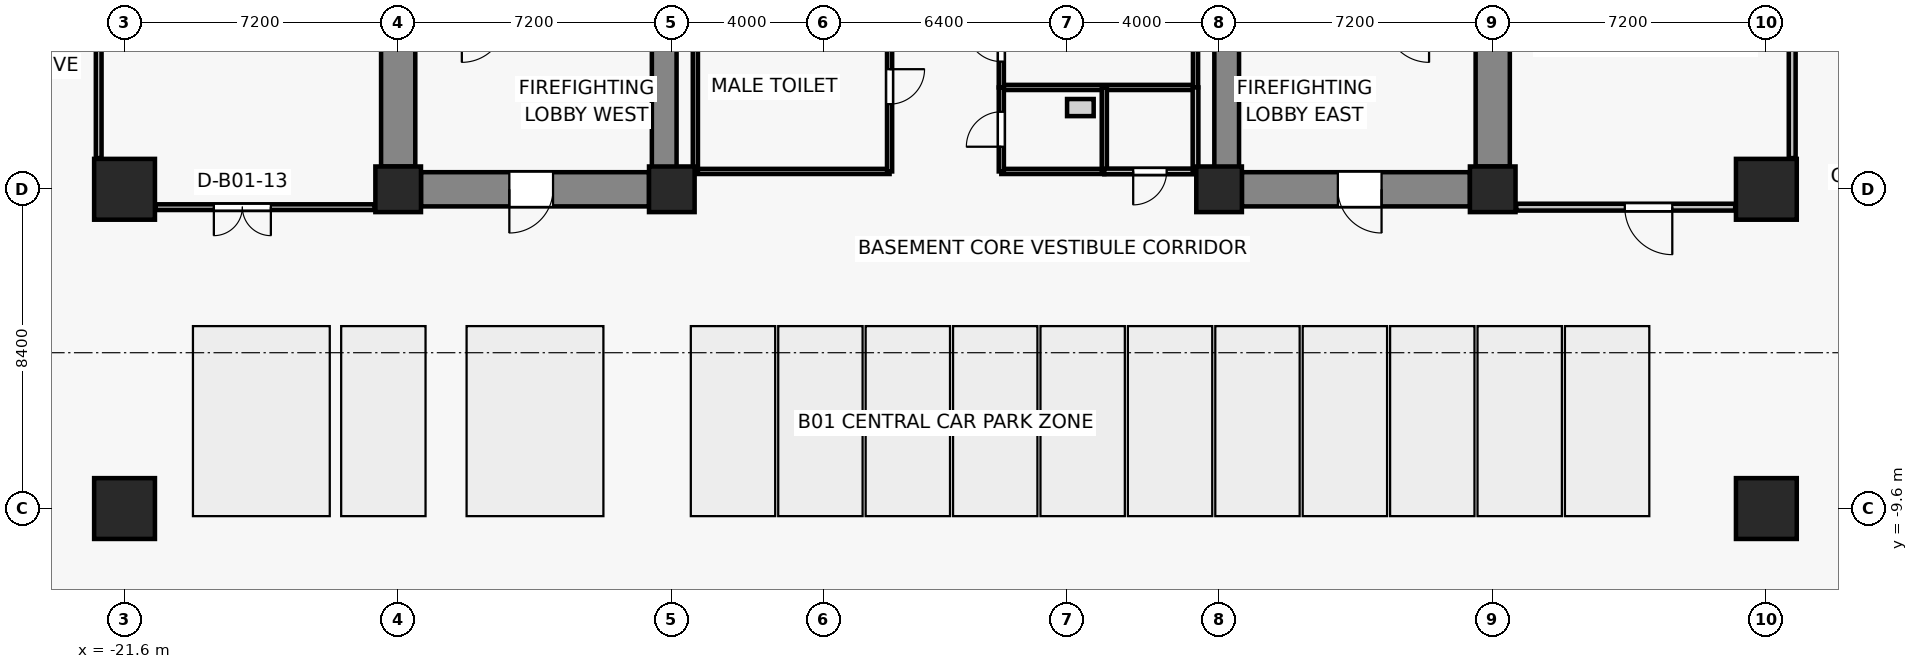
"""IFC4 building model, lengths in metres.
Left out: names, types, materials, properties, quantities, classifications, styles, units other than length and angle.
Written with IfcOpenShell. Run it as: python <this file> out.ifc"""

import sys

from ifc_helpers import new_model, si_unit, direction, frame, frame_2d, origin, origin_2d, place, context, subcontext, project, spatial, rectangle, extrude, source, transform, mapped, element, fill, save


model = new_model("IFC4")
c1 = context("Model", 3, precision=1e-05, world=origin(), true_north=direction((0.0, 1.0)))
c2 = subcontext(c1, "Body", "Model", "MODEL_VIEW")
j1 = project(units=[si_unit("LENGTHUNIT", "METRE"), si_unit("PLANEANGLEUNIT", "RADIAN")], contexts=[c1])
p1 = place(None, origin())
s1 = spatial("IfcSite", under=j1, at=p1, CompositionType="ELEMENT")
p2 = place(p1, origin())
s2 = spatial("IfcBuilding", under=s1, at=p2, CompositionType="ELEMENT")
p3 = place(p2, frame((0.0, 0.0, -4.4)))
s3 = spatial("IfcBuildingStorey", under=s2, at=p3, CompositionType="ELEMENT", Elevation=-4.4)
for number, where, z_axis, x_axis in (
    (1, (-14.4, -1.2, 0.0), (0.0, 0.0, 1.0), (1.0, 0.0, 0.0)),
    (2, (-7.2, -1.2, 0.0), (0.0, 0.0, 1.0), (1.0, 0.0, 0.0)),
    (3, (7.2, -1.2, 0.0), (0.0, 0.0, 1.0), (1.0, 0.0, 0.0)),
    (4, (14.4, -1.2, 0.0), (0.0, 0.0, 1.0), (1.0, 0.0, 0.0)),
):
    element("IfcColumn", number, at=place(p3, frame(where, z_axis=z_axis, x_axis=x_axis)), inside=s3, PredefinedType="COLUMN", context=c2, shape_type="SweptSolid", body=[
        extrude(rectangle(XDim=1.2, YDim=1.2, at=origin_2d()), origin(), (0.0, 0.0, 1.0), 4.4),
    ])
for number, where, z_axis, x_axis in (
    (5, (-21.6, -9.6, 0.0), (0.0, 0.0, 1.0), (1.0, 0.0, 0.0)),
    (6, (21.6, -9.6, 0.0), (0.0, 0.0, 1.0), (1.0, 0.0, 0.0)),
    (7, (-21.6, -1.2, 0.0), (0.0, 0.0, 1.0), (1.0, 0.0, 0.0)),
    (8, (21.6, -1.2, 0.0), (0.0, 0.0, 1.0), (1.0, 0.0, 0.0)),
):
    element("IfcColumn", number, at=place(p3, frame(where, z_axis=z_axis, x_axis=x_axis)), inside=s3, PredefinedType="COLUMN", context=c2, shape_type="SweptSolid", body=[
        extrude(rectangle(XDim=1.6, YDim=1.6, at=origin_2d()), origin(), (0.0, 0.0, 1.0), 4.4),
    ])
for number, where, z_axis, x_axis in (
    (9, (-14.4, -0.6, 0.0), (0.0, 0.0, 1.0), (0.0, 1.0, 0.0)),
    (10, (14.4, -0.6, 0.0), (0.0, 0.0, 1.0), (0.0, 1.0, 0.0)),
):
    element("IfcWall", number, at=place(p3, frame(where, z_axis=z_axis, x_axis=x_axis)), inside=s3, PredefinedType="SHEAR", context=c2, shape_type="SweptSolid", body=[
        extrude(rectangle(XDim=6.6, YDim=0.9, at=frame_2d((3.3, 0.0))), origin(), (0.0, 0.0, 1.0), 4.1),
    ])
p4 = place(p3, frame((-7.8, -1.2, 0.0), z_axis=(0.0, 0.0, 1.0), x_axis=(-1.0, 0.0, 0.0)))
e11 = element("IfcWall", 11, at=p4, inside=s3, PredefinedType="SHEAR", context=c2, shape_type="SweptSolid", body=[
    extrude(rectangle(XDim=6.0, YDim=0.9, at=frame_2d((3.0, 0.0))), origin(), (0.0, 0.0, 1.0), 4.1),
])
p5 = place(p4, frame((2.525, 0.0, 0.0)))
e12 = element("IfcOpeningElement", 12, at=p5, cuts=e11, PredefinedType="OPENING", context=c2, shape_type="SweptSolid", body=[
    extrude(rectangle(XDim=1.15, YDim=2.15, at=frame_2d((0.575, 1.075))), frame((0.0, 0.46, 0.0), z_axis=(0.0, -1.0, 0.0), x_axis=(1.0, 0.0, 0.0)), (0.0, 0.0, 1.0), 0.92),
])
p6 = place(p3, frame((13.8, -1.2, 0.0), z_axis=(0.0, 0.0, 1.0), x_axis=(-1.0, 0.0, 0.0)))
e13 = element("IfcWall", 13, at=p6, inside=s3, PredefinedType="SHEAR", context=c2, shape_type="SweptSolid", body=[
    extrude(rectangle(XDim=6.0, YDim=0.9, at=frame_2d((3.0, 0.0))), origin(), (0.0, 0.0, 1.0), 4.1),
])
p7 = place(p6, frame((2.325, 0.0, 0.0)))
e14 = element("IfcOpeningElement", 14, at=p7, cuts=e13, PredefinedType="OPENING", context=c2, shape_type="SweptSolid", body=[
    extrude(rectangle(XDim=1.15, YDim=2.15, at=frame_2d((0.575, 1.075))), frame((0.0, 0.46, 0.0), z_axis=(0.0, -1.0, 0.0), x_axis=(1.0, 0.0, 0.0)), (0.0, 0.0, 1.0), 0.92),
])
for number, where, z_axis, x_axis in (
    (15, (-7.4, -0.75, 0.0), (0.0, 0.0, 1.0), (0.0, 1.0, 0.0)),
    (16, (7.4, -0.75, 0.0), (0.0, 0.0, 1.0), (0.0, 1.0, 0.0)),
):
    element("IfcWall", number, at=place(p3, frame(where, z_axis=z_axis, x_axis=x_axis)), inside=s3, PredefinedType="SHEAR", context=c2, shape_type="SweptSolid", body=[
        extrude(rectangle(XDim=4.0, YDim=0.65, at=frame_2d((2.0, 0.0))), origin(), (0.0, 0.0, 1.0), 4.1),
    ])
p8 = place(p3, frame((-1.47, -0.73, 0.0), z_axis=(0.0, 0.0, 1.0), x_axis=(-1.0, 0.0, 0.0)))
e17 = element("IfcWall", 17, at=p8, inside=s3, PredefinedType="PARTITIONING", context=c2, shape_type="SweptSolid", body=[
    extrude(rectangle(XDim=5.11, YDim=0.135, at=frame_2d((2.555, 0.0))), origin(), (0.0, 0.0, 1.0), 4.1),
])
p9 = place(p3, frame((-6.58, -0.73, 0.0), z_axis=(0.0, 0.0, 1.0), x_axis=(0.0, 1.0, 0.0)))
e18 = element("IfcWall", 18, at=p9, inside=s3, PredefinedType="PARTITIONING", context=c2, shape_type="SweptSolid", body=[
    extrude(rectangle(XDim=4.49, YDim=0.135, at=frame_2d((2.245, 0.0))), origin(), (0.0, 0.0, 1.0), 3.473),
])
p10 = place(p3, frame((-1.47, 3.76, 0.0), z_axis=(0.0, 0.0, 1.0), x_axis=(0.0, -1.0, 0.0)))
e19 = element("IfcWall", 19, at=p10, inside=s3, PredefinedType="PARTITIONING", context=c2, shape_type="SweptSolid", body=[
    extrude(rectangle(XDim=4.49, YDim=0.135, at=frame_2d((2.245, 0.0))), origin(), (0.0, 0.0, 1.0), 3.473),
])
p11 = place(p10, frame((1.8, 0.0, 0.0)))
e20 = element("IfcOpeningElement", 20, at=p11, cuts=e19, PredefinedType="OPENING", context=c2, shape_type="SweptSolid", body=[
    extrude(rectangle(XDim=0.92, YDim=2.1, at=frame_2d((0.46, 1.05))), frame((0.0, 0.077, 0.0), z_axis=(0.0, -1.0, 0.0), x_axis=(1.0, 0.0, 0.0)), (0.0, 0.0, 1.0), 0.155),
])
p12 = place(p3, frame((6.58, 1.48, 0.0), z_axis=(0.0, 0.0, 1.0), x_axis=(-1.0, 0.0, 0.0)))
e21 = element("IfcWall", 21, at=p12, inside=s3, PredefinedType="PARTITIONING", context=c2, shape_type="SweptSolid", body=[
    extrude(rectangle(XDim=5.11, YDim=0.135, at=frame_2d((2.555, 0.0))), origin(), (0.0, 0.0, 1.0), 4.1),
])
p13 = place(p3, frame((1.47, 1.48, 0.0), z_axis=(0.0, 0.0, 1.0), x_axis=(0.0, 1.0, 0.0)))
e22 = element("IfcWall", 22, at=p13, inside=s3, PredefinedType="PARTITIONING", context=c2, shape_type="SweptSolid", body=[
    extrude(rectangle(XDim=2.28, YDim=0.135, at=frame_2d((1.14, 0.0))), origin(), (0.0, 0.0, 1.0), 3.473),
])
p14 = place(p13, frame((0.68, 0.0, 0.0)))
e23 = element("IfcOpeningElement", 23, at=p14, cuts=e22, PredefinedType="OPENING", context=c2, shape_type="SweptSolid", body=[
    extrude(rectangle(XDim=0.92, YDim=2.1, at=frame_2d((0.46, 1.05))), frame((0.0, 0.077, 0.0), z_axis=(0.0, -1.0, 0.0), x_axis=(1.0, 0.0, 0.0)), (0.0, 0.0, 1.0), 0.155),
])
p15 = place(p3, frame((6.58, 3.76, 0.0), z_axis=(0.0, 0.0, 1.0), x_axis=(0.0, -1.0, 0.0)))
e24 = element("IfcWall", 24, at=p15, inside=s3, PredefinedType="PARTITIONING", context=c2, shape_type="SweptSolid", body=[
    extrude(rectangle(XDim=2.28, YDim=0.135, at=frame_2d((1.14, 0.0))), origin(), (0.0, 0.0, 1.0), 3.473),
])
p16 = place(p3, frame((4.18, -0.73, 0.0), z_axis=(0.0, 0.0, 1.0), x_axis=(-1.0, 0.0, 0.0)))
e25 = element("IfcWall", 25, at=p16, inside=s3, PredefinedType="PARTITIONING", context=c2, shape_type="SweptSolid", body=[
    extrude(rectangle(XDim=2.71, YDim=0.135, at=frame_2d((1.355, 0.0))), origin(), (0.0, 0.0, 1.0), 4.1),
])
p17 = place(p3, frame((1.47, -0.73, 0.0), z_axis=(0.0, 0.0, 1.0), x_axis=(0.0, 1.0, 0.0)))
e26 = element("IfcWall", 26, at=p17, inside=s3, PredefinedType="PARTITIONING", context=c2, shape_type="SweptSolid", body=[
    extrude(rectangle(XDim=2.21, YDim=0.135, at=frame_2d((1.105, 0.0))), origin(), (0.0, 0.0, 1.0), 4.1),
])
p18 = place(p17, frame((0.65, 0.0, 0.0)))
e27 = element("IfcOpeningElement", 27, at=p18, cuts=e26, PredefinedType="OPENING", context=c2, shape_type="SweptSolid", body=[
    extrude(rectangle(XDim=0.92, YDim=2.1, at=frame_2d((0.46, 1.05))), frame((0.0, 0.077, 0.0), z_axis=(0.0, -1.0, 0.0), x_axis=(1.0, 0.0, 0.0)), (0.0, 0.0, 1.0), 0.155),
])
p19 = place(p3, frame((4.18, 1.48, 0.0), z_axis=(0.0, 0.0, 1.0), x_axis=(0.0, -1.0, 0.0)))
e28 = element("IfcWall", 28, at=p19, inside=s3, PredefinedType="PARTITIONING", context=c2, shape_type="SweptSolid", body=[
    extrude(rectangle(XDim=2.21, YDim=0.135, at=frame_2d((1.105, 0.0))), origin(), (0.0, 0.0, 1.0), 4.1),
])
p20 = place(p3, frame((6.58, -0.73, 0.0), z_axis=(0.0, 0.0, 1.0), x_axis=(-1.0, 0.0, 0.0)))
e29 = element("IfcWall", 29, at=p20, inside=s3, PredefinedType="PARTITIONING", context=c2, shape_type="SweptSolid", body=[
    extrude(rectangle(XDim=2.4, YDim=0.15, at=frame_2d((1.2, 0.0))), origin(), (0.0, 0.0, 1.0), 4.1),
])
p21 = place(p20, frame((0.76, 0.0, 0.0)))
e30 = element("IfcOpeningElement", 30, at=p21, cuts=e29, PredefinedType="OPENING", context=c2, shape_type="SweptSolid", body=[
    extrude(rectangle(XDim=0.88, YDim=2.1, at=frame_2d((0.44, 1.05))), frame((0.0, 0.085, 0.0), z_axis=(0.0, -1.0, 0.0), x_axis=(1.0, 0.0, 0.0)), (0.0, 0.0, 1.0), 0.17),
])
p22 = place(p3, frame((6.58, 1.48, 0.0), z_axis=(0.0, 0.0, 1.0), x_axis=(0.0, -1.0, 0.0)))
e31 = element("IfcWall", 31, at=p22, inside=s3, PredefinedType="PARTITIONING", context=c2, shape_type="SweptSolid", body=[
    extrude(rectangle(XDim=2.21, YDim=0.15, at=frame_2d((1.105, 0.0))), origin(), (0.0, 0.0, 1.0), 4.1),
])
p23 = place(p3, frame((-15.02, -1.67, 0.0), z_axis=(0.0, 0.0, 1.0), x_axis=(-1.0, 0.0, 0.0)))
e32 = element("IfcWall", 32, at=p23, inside=s3, PredefinedType="PARTITIONING", context=c2, shape_type="SweptSolid", body=[
    extrude(rectangle(XDim=5.76, YDim=0.15, at=frame_2d((2.88, 0.0))), origin(), (0.0, 0.0, 1.0), 4.1),
])
p24 = place(p23, frame((2.73, 0.0, 0.0)))
e33 = element("IfcOpeningElement", 33, at=p24, cuts=e32, PredefinedType="OPENING", context=c2, shape_type="SweptSolid", body=[
    extrude(rectangle(XDim=1.5, YDim=2.2, at=frame_2d((0.75, 1.1))), frame((0.0, 0.085, 0.0), z_axis=(0.0, -1.0, 0.0), x_axis=(1.0, 0.0, 0.0)), (0.0, 0.0, 1.0), 0.17),
])
p25 = place(p3, frame((-22.28, -0.38, 0.0), z_axis=(0.0, 0.0, 1.0), x_axis=(0.0, 1.0, 0.0)))
e34 = element("IfcWall", 34, at=p25, inside=s3, PredefinedType="PARTITIONING", context=c2, shape_type="SweptSolid", body=[
    extrude(rectangle(XDim=4.41, YDim=0.15, at=frame_2d((2.205, 0.0))), origin(), (0.0, 0.0, 1.0), 3.473),
])
p26 = place(p3, frame((20.78, -1.67, 0.0), z_axis=(0.0, 0.0, 1.0), x_axis=(-1.0, 0.0, 0.0)))
e35 = element("IfcWall", 35, at=p26, inside=s3, PredefinedType="PARTITIONING", context=c2, shape_type="SweptSolid", body=[
    extrude(rectangle(XDim=5.76, YDim=0.18, at=frame_2d((2.88, 0.0))), origin(), (0.0, 0.0, 1.0), 4.1),
])
p27 = place(p26, frame((1.655, 0.0, 0.0)))
e36 = element("IfcOpeningElement", 36, at=p27, cuts=e35, PredefinedType="OPENING", context=c2, shape_type="SweptSolid", body=[
    extrude(rectangle(XDim=1.25, YDim=2.15, at=frame_2d((0.625, 1.075))), frame((0.0, 0.1, 0.0), z_axis=(0.0, -1.0, 0.0), x_axis=(1.0, 0.0, 0.0)), (0.0, 0.0, 1.0), 0.2),
])
p28 = place(p3, frame((22.28, 5.78, 0.0), z_axis=(0.0, 0.0, 1.0), x_axis=(0.0, -1.0, 0.0)))
e37 = element("IfcWall", 37, at=p28, inside=s3, PredefinedType="PARTITIONING", context=c2, shape_type="SweptSolid", body=[
    extrude(rectangle(XDim=6.16, YDim=0.18, at=frame_2d((3.08, 0.0))), origin(), (0.0, 0.0, 1.0), 3.473),
])
m1 = source(origin(), c2, "Body", "SweptSolid", [
    extrude(rectangle(XDim=1.15, YDim=2.15, at=frame_2d((0.575, 1.075))), frame((0.0, 0.025, 0.0), z_axis=(0.0, -1.0, 0.0), x_axis=(1.0, 0.0, 0.0)), (0.0, 0.0, 1.0), 0.05),
])
p29 = place(p5, origin())
e38 = element("IfcDoor", 38, at=p29, inside=s3, OperationType="SINGLE_SWING_RIGHT", PredefinedType="DOOR", context=c2, shape_type="MappedRepresentation", body=[
    mapped(m1, transform((0.0, 0.0, 0.0), x_axis=(1.0, 0.0, 0.0), y_axis=(0.0, 1.0, 0.0), z_axis=(0.0, 0.0, 1.0), scale=1.0)),
])
fill(e12, e38)
p30 = place(p7, origin())
e39 = element("IfcDoor", 39, at=p30, inside=s3, OperationType="SINGLE_SWING_LEFT", PredefinedType="DOOR", context=c2, shape_type="MappedRepresentation", body=[
    mapped(m1, transform((0.0, 0.0, 0.0), x_axis=(1.0, 0.0, 0.0), y_axis=(0.0, 1.0, 0.0), z_axis=(0.0, 0.0, 1.0), scale=1.0)),
])
fill(e14, e39)
m2 = source(origin(), c2, "Body", "SweptSolid", [
    extrude(rectangle(XDim=0.92, YDim=2.1, at=frame_2d((0.46, 1.05))), frame((0.0, 0.025, 0.0), z_axis=(0.0, -1.0, 0.0), x_axis=(1.0, 0.0, 0.0)), (0.0, 0.0, 1.0), 0.05),
])
p31 = place(p11, origin())
e40 = element("IfcDoor", 40, at=p31, inside=s3, OperationType="SINGLE_SWING_LEFT", PredefinedType="DOOR", context=c2, shape_type="MappedRepresentation", body=[
    mapped(m2, transform((0.0, 0.0, 0.0), x_axis=(1.0, 0.0, 0.0), y_axis=(0.0, 1.0, 0.0), z_axis=(0.0, 0.0, 1.0), scale=1.0)),
])
fill(e20, e40)
p32 = place(p14, origin())
e41 = element("IfcDoor", 41, at=p32, inside=s3, OperationType="SINGLE_SWING_RIGHT", PredefinedType="DOOR", context=c2, shape_type="MappedRepresentation", body=[
    mapped(m2, transform((0.0, 0.0, 0.0), x_axis=(1.0, 0.0, 0.0), y_axis=(0.0, 1.0, 0.0), z_axis=(0.0, 0.0, 1.0), scale=1.0)),
])
fill(e23, e41)
p33 = place(p18, origin())
e42 = element("IfcDoor", 42, at=p33, inside=s3, OperationType="SINGLE_SWING_LEFT", PredefinedType="DOOR", context=c2, shape_type="MappedRepresentation", body=[
    mapped(m2, transform((0.0, 0.0, 0.0), x_axis=(1.0, 0.0, 0.0), y_axis=(0.0, 1.0, 0.0), z_axis=(0.0, 0.0, 1.0), scale=1.0)),
])
fill(e27, e42)
m3 = source(origin(), c2, "Body", "SweptSolid", [
    extrude(rectangle(XDim=0.88, YDim=2.1, at=frame_2d((0.44, 1.05))), frame((0.0, 0.025, 0.0), z_axis=(0.0, -1.0, 0.0), x_axis=(1.0, 0.0, 0.0)), (0.0, 0.0, 1.0), 0.05),
])
p34 = place(p21, origin())
e43 = element("IfcDoor", 43, at=p34, inside=s3, OperationType="SINGLE_SWING_RIGHT", PredefinedType="DOOR", context=c2, shape_type="MappedRepresentation", body=[
    mapped(m3, transform((0.0, 0.0, 0.0), x_axis=(1.0, 0.0, 0.0), y_axis=(0.0, 1.0, 0.0), z_axis=(0.0, 0.0, 1.0), scale=1.0)),
])
fill(e30, e43)
m4 = source(origin(), c2, "Body", "SweptSolid", [
    extrude(rectangle(XDim=1.5, YDim=2.2, at=frame_2d((0.75, 1.1))), frame((0.0, 0.025, 0.0), z_axis=(0.0, -1.0, 0.0), x_axis=(1.0, 0.0, 0.0)), (0.0, 0.0, 1.0), 0.05),
])
p35 = place(p24, origin())
e44 = element("IfcDoor", 44, at=p35, inside=s3, OperationType="DOUBLE_DOOR_SINGLE_SWING", PredefinedType="DOOR", context=c2, shape_type="MappedRepresentation", body=[
    mapped(m4, transform((0.0, 0.0, 0.0), x_axis=(1.0, 0.0, 0.0), y_axis=(0.0, 1.0, 0.0), z_axis=(0.0, 0.0, 1.0), scale=1.0)),
])
fill(e33, e44)
m5 = source(origin(), c2, "Body", "SweptSolid", [
    extrude(rectangle(XDim=1.25, YDim=2.15, at=frame_2d((0.625, 1.075))), frame((0.0, 0.025, 0.0), z_axis=(0.0, -1.0, 0.0), x_axis=(1.0, 0.0, 0.0)), (0.0, 0.0, 1.0), 0.05),
])
p36 = place(p27, origin())
e45 = element("IfcDoor", 45, at=p36, inside=s3, OperationType="SINGLE_SWING_LEFT", PredefinedType="DOOR", context=c2, shape_type="MappedRepresentation", body=[
    mapped(m5, transform((0.0, 0.0, 0.0), x_axis=(1.0, 0.0, 0.0), y_axis=(0.0, 1.0, 0.0), z_axis=(0.0, 0.0, 1.0), scale=1.0)),
])
fill(e36, e45)
save(model, sys.argv[1])
